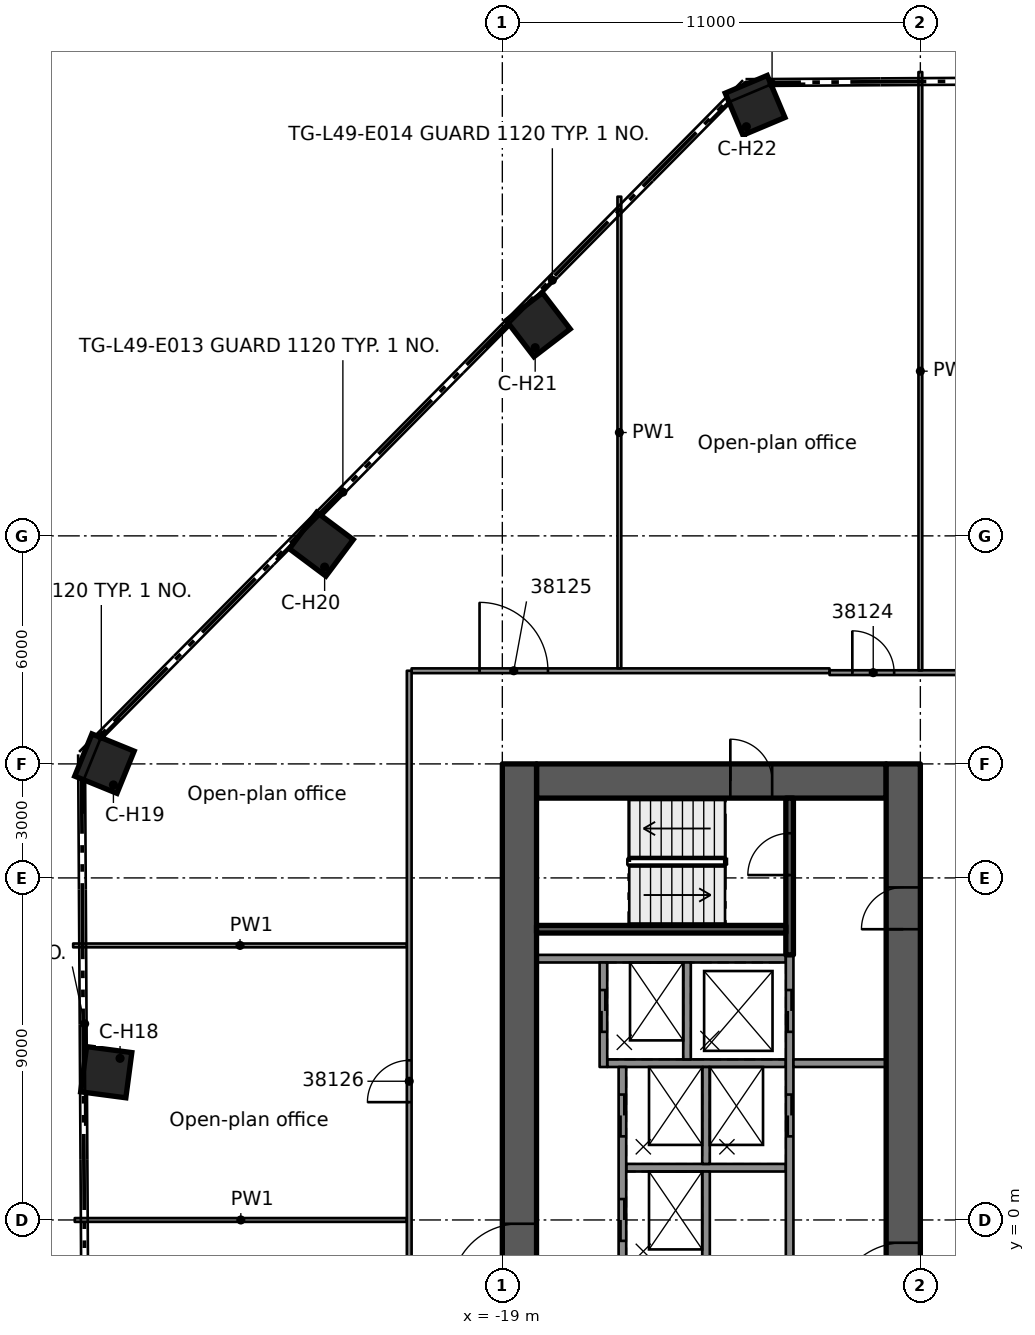
"""IFC4 building model, lengths in metres.
Left out: names, types, materials, properties, quantities, classifications, styles, units other than length and angle.
Written with IfcOpenShell. Run it as: python <this file> out.ifc"""

import sys

from ifc_helpers import new_model, si_unit, direction, frame, frame_2d, origin, origin_2d, place, context, subcontext, project, spatial, rectangle, extrude, element, fill, save


model = new_model("IFC4")
c1 = context("Model", 3, precision=1e-05, world=origin(), true_north=direction((0.0, 1.0)))
c2 = subcontext(c1, "Body", "Model", "MODEL_VIEW")
j1 = project(units=[si_unit("LENGTHUNIT", "METRE"), si_unit("PLANEANGLEUNIT", "RADIAN")], contexts=[c1])
p1 = place(None, origin())
s1 = spatial("IfcSite", under=j1, at=p1, CompositionType="ELEMENT")
p2 = place(p1, origin())
s2 = spatial("IfcBuilding", under=s1, at=p2, CompositionType="ELEMENT")
p3 = place(p2, frame((0.0, 0.0, 188.6)))
s3 = spatial("IfcBuildingStorey", under=s2, at=p3, CompositionType="ELEMENT", Elevation=188.6)
p4 = place(p3, frame((-18.1, 11.55, 0.0), z_axis=(0.0, 0.0, 1.0), x_axis=(1.0, 0.0, 0.0)))
e1 = element("IfcWall", 1, at=p4, inside=s3, PredefinedType="SHEAR", context=c2, shape_type="SweptSolid", body=[
    extrude(rectangle(XDim=9.2, YDim=0.9, at=frame_2d((4.6, 0.0))), origin(), (0.0, 0.0, 1.0), 3.5),
])
p5 = place(p4, frame((5.1, 0.0, 0.0)))
e2 = element("IfcOpeningElement", 2, at=p5, cuts=e1, PredefinedType="OPENING", context=c2, shape_type="SweptSolid", body=[
    extrude(rectangle(XDim=1.1, YDim=2.1, at=frame_2d((0.55, 1.05))), frame((0.0, 0.46, 0.0), z_axis=(0.0, -1.0, 0.0), x_axis=(1.0, 0.0, 0.0)), (0.0, 0.0, 1.0), 0.92),
])
p6 = place(p3, frame((-18.55, -12.0, 0.0), z_axis=(0.0, 0.0, 1.0), x_axis=(0.0, 1.0, 0.0)))
e3 = element("IfcWall", 3, at=p6, inside=s3, PredefinedType="SHEAR", context=c2, shape_type="SweptSolid", body=[
    extrude(rectangle(XDim=24.0, YDim=0.9, at=frame_2d((12.0, 0.0))), origin(), (0.0, 0.0, 1.0), 3.5),
])
p7 = place(p6, frame((10.1, 0.0, 0.0)))
e4 = element("IfcOpeningElement", 4, at=p7, cuts=e3, PredefinedType="OPENING", context=c2, shape_type="SweptSolid", body=[
    extrude(rectangle(XDim=1.8, YDim=2.1, at=frame_2d((0.9, 1.05))), frame((0.0, 0.46, 0.0), z_axis=(0.0, -1.0, 0.0), x_axis=(1.0, 0.0, 0.0)), (0.0, 0.0, 1.0), 0.92),
])
p8 = place(p3, frame((-8.45, -12.0, 0.0), z_axis=(0.0, 0.0, 1.0), x_axis=(0.0, 1.0, 0.0)))
e5 = element("IfcWall", 5, at=p8, inside=s3, PredefinedType="SHEAR", context=c2, shape_type="SweptSolid", body=[
    extrude(rectangle(XDim=24.0, YDim=0.9, at=frame_2d((12.0, 0.0))), origin(), (0.0, 0.0, 1.0), 3.5),
])
p9 = place(p8, frame((9.6, 0.0, 0.0)))
e6 = element("IfcOpeningElement", 6, at=p9, cuts=e5, PredefinedType="OPENING", context=c2, shape_type="SweptSolid", body=[
    extrude(rectangle(XDim=1.8, YDim=2.1, at=frame_2d((0.9, 1.05))), frame((0.0, 0.46, 0.0), z_axis=(0.0, -1.0, 0.0), x_axis=(1.0, 0.0, 0.0)), (0.0, 0.0, 1.0), 0.92),
])
p10 = place(p8, frame((19.65, 0.0, 0.0)))
e7 = element("IfcOpeningElement", 7, at=p10, cuts=e5, PredefinedType="OPENING", context=c2, shape_type="SweptSolid", body=[
    extrude(rectangle(XDim=1.1, YDim=2.1, at=frame_2d((0.55, 1.05))), frame((0.0, 0.46, 0.0), z_axis=(0.0, -1.0, 0.0), x_axis=(1.0, 0.0, 0.0)), (0.0, 0.0, 1.0), 0.92),
])
for number, where, z_axis, x_axis in (
    (8, (-29.423, 3.888, 0.0), (0.0, 0.0, 1.0), (-0.991, 0.131, 0.0)),
    (9, (-29.47, 12.007, 0.0), (0.0, 0.0, 1.0), (-0.926, 0.377, 0.0)),
    (10, (-23.763, 17.781, 0.0), (0.0, 0.0, 1.0), (-0.801, 0.599, 0.0)),
    (11, (-18.056, 23.555, 0.0), (0.0, 0.0, 1.0), (-0.608, 0.794, 0.0)),
    (12, (-12.349, 29.329, 0.0), (0.0, 0.0, 1.0), (-0.388, 0.922, 0.0)),
):
    element("IfcColumn", number, at=place(p3, frame(where, z_axis=z_axis, x_axis=x_axis)), inside=s3, PredefinedType="COLUMN", context=c2, shape_type="SweptSolid", body=[
        extrude(rectangle(XDim=1.2, YDim=1.2, at=origin_2d()), origin(), (0.0, 0.0, 1.0), 3.5),
    ])
p11 = place(p3, frame((-11.54, 6.875, 0.0), z_axis=(0.0, 0.0, 1.0), x_axis=(-1.0, 0.0, 0.0)))
e13 = element("IfcWall", 13, at=p11, inside=s3, PredefinedType="SOLIDWALL", context=c2, shape_type="SweptSolid", body=[
    extrude(rectangle(XDim=6.56, YDim=0.2, at=frame_2d((3.28, 0.0))), origin(), (0.0, 0.0, 1.0), 3.08),
])
p12 = place(p3, frame((-11.54, 1.375, 0.0), z_axis=(0.0, 0.0, 1.0), x_axis=(-1.0, 0.0, 0.0)))
e14 = element("IfcWall", 14, at=p12, inside=s3, PredefinedType="SOLIDWALL", context=c2, shape_type="SweptSolid", body=[
    extrude(rectangle(XDim=4.2, YDim=0.2, at=frame_2d((2.1, 0.0))), origin(), (0.0, 0.0, 1.0), 3.08),
])
p13 = place(p3, frame((-11.54, 4.125, 0.0), z_axis=(0.0, 0.0, 1.0), x_axis=(-1.0, 0.0, 0.0)))
e15 = element("IfcWall", 15, at=p13, inside=s3, PredefinedType="SOLIDWALL", context=c2, shape_type="SweptSolid", body=[
    extrude(rectangle(XDim=4.7, YDim=0.2, at=frame_2d((2.35, 0.0))), origin(), (0.0, 0.0, 1.0), 3.08),
])
p14 = place(p3, frame((-11.44, -6.975, 0.0), z_axis=(0.0, 0.0, 1.0), x_axis=(0.0, 1.0, 0.0)))
e16 = element("IfcWall", 16, at=p14, inside=s3, PredefinedType="SOLIDWALL", context=c2, shape_type="SweptSolid", body=[
    extrude(rectangle(XDim=13.95, YDim=0.2, at=frame_2d((6.975, 0.0))), origin(), (0.0, 0.0, 1.0), 3.08),
])
p15 = place(p14, frame((9.175, 0.0, 0.0)))
e17 = element("IfcOpeningElement", 17, at=p15, cuts=e16, PredefinedType="OPENING", context=c2, shape_type="SweptSolid", body=[
    extrude(rectangle(XDim=1.1, YDim=2.1, at=frame_2d((0.55, 1.05))), frame((0.0, 0.11, 0.0), z_axis=(0.0, -1.0, 0.0), x_axis=(1.0, 0.0, 0.0)), (0.0, 0.0, 1.0), 0.22),
])
p16 = place(p14, frame((11.925, 0.0, 0.0)))
e18 = element("IfcOpeningElement", 18, at=p16, cuts=e16, PredefinedType="OPENING", context=c2, shape_type="SweptSolid", body=[
    extrude(rectangle(XDim=1.1, YDim=2.1, at=frame_2d((0.55, 1.05))), frame((0.0, 0.11, 0.0), z_axis=(0.0, -1.0, 0.0), x_axis=(1.0, 0.0, 0.0)), (0.0, 0.0, 1.0), 0.22),
])
p17 = place(p14, frame((1.075, 0.0, 0.0)))
e19 = element("IfcOpeningElement", 19, at=p17, cuts=e16, PredefinedType="OPENING", context=c2, shape_type="SweptSolid", body=[
    extrude(rectangle(XDim=0.8, YDim=2.1, at=frame_2d((0.4, 1.05))), frame((0.0, 0.11, 0.0), z_axis=(0.0, -1.0, 0.0), x_axis=(1.0, 0.0, 0.0)), (0.0, 0.0, 1.0), 0.22),
])
p18 = place(p3, frame((-13.64, -6.775, 0.0), z_axis=(0.0, 0.0, 1.0), x_axis=(0.0, 1.0, 0.0)))
e20 = element("IfcWall", 20, at=p18, inside=s3, PredefinedType="SOLIDWALL", context=c2, shape_type="SweptSolid", body=[
    extrude(rectangle(XDim=8.05, YDim=0.2, at=frame_2d((4.025, 0.0))), origin(), (0.0, 0.0, 1.0), 3.08),
])
for number, where, z_axis, x_axis in (
    (21, (-13.64, 1.475, 0.0), (0.0, 0.0, 1.0), (0.0, 1.0, 0.0)),
    (22, (-14.14, 4.225, 0.0), (0.0, 0.0, 1.0), (0.0, 1.0, 0.0)),
):
    element("IfcWall", number, at=place(p3, frame(where, z_axis=z_axis, x_axis=x_axis)), inside=s3, PredefinedType="SOLIDWALL", context=c2, shape_type="SweptSolid", body=[
        extrude(rectangle(XDim=2.55, YDim=0.2, at=frame_2d((1.275, 0.0))), origin(), (0.0, 0.0, 1.0), 3.08),
    ])
p19 = place(p3, frame((-15.84, -4.025, 0.0), z_axis=(0.0, 0.0, 1.0), x_axis=(0.0, 1.0, 0.0)))
e23 = element("IfcWall", 23, at=p19, inside=s3, PredefinedType="SOLIDWALL", context=c2, shape_type="SweptSolid", body=[
    extrude(rectangle(XDim=8.05, YDim=0.2, at=frame_2d((4.025, 0.0))), origin(), (0.0, 0.0, 1.0), 3.08),
])
p20 = place(p19, frame((3.475, 0.0, 0.0)))
e24 = element("IfcOpeningElement", 24, at=p20, cuts=e23, PredefinedType="OPENING", context=c2, shape_type="SweptSolid", body=[
    extrude(rectangle(XDim=1.1, YDim=2.1, at=frame_2d((0.55, 1.05))), frame((0.0, 0.11, 0.0), z_axis=(0.0, -1.0, 0.0), x_axis=(1.0, 0.0, 0.0)), (0.0, 0.0, 1.0), 0.22),
])
p21 = place(p19, frame((6.225, 0.0, 0.0)))
e25 = element("IfcOpeningElement", 25, at=p21, cuts=e23, PredefinedType="OPENING", context=c2, shape_type="SweptSolid", body=[
    extrude(rectangle(XDim=1.1, YDim=2.1, at=frame_2d((0.55, 1.05))), frame((0.0, 0.11, 0.0), z_axis=(0.0, -1.0, 0.0), x_axis=(1.0, 0.0, 0.0)), (0.0, 0.0, 1.0), 0.22),
])
p22 = place(p3, frame((-16.34, 4.025, 0.0), z_axis=(0.0, 0.0, 1.0), x_axis=(0.0, 1.0, 0.0)))
e26 = element("IfcWall", 26, at=p22, inside=s3, PredefinedType="SOLIDWALL", context=c2, shape_type="SweptSolid", body=[
    extrude(rectangle(XDim=2.75, YDim=0.2, at=frame_2d((1.375, 0.0))), origin(), (0.0, 0.0, 1.0), 3.08),
])
p23 = place(p22, frame((0.925, 0.0, 0.0)))
e27 = element("IfcOpeningElement", 27, at=p23, cuts=e26, PredefinedType="OPENING", context=c2, shape_type="SweptSolid", body=[
    extrude(rectangle(XDim=1.1, YDim=2.1, at=frame_2d((0.55, 1.05))), frame((0.0, 0.11, 0.0), z_axis=(0.0, -1.0, 0.0), x_axis=(1.0, 0.0, 0.0)), (0.0, 0.0, 1.0), 0.22),
])
p24 = place(p3, frame((-11.44, 6.975, 0.0), z_axis=(0.0, 0.0, 1.0), x_axis=(0.0, 1.0, 0.0)))
e28 = element("IfcWall", 28, at=p24, inside=s3, PredefinedType="SOLIDWALL", context=c2, shape_type="SweptSolid", body=[
    extrude(rectangle(XDim=4.125, YDim=0.2, at=frame_2d((2.062, 0.0))), origin(), (0.0, 0.0, 1.0), 3.08),
])
p25 = place(p24, frame((2.1, 0.0, 0.0)))
e29 = element("IfcOpeningElement", 29, at=p25, cuts=e28, PredefinedType="OPENING", context=c2, shape_type="SweptSolid", body=[
    extrude(rectangle(XDim=1.1, YDim=2.1, at=frame_2d((0.55, 1.05))), frame((0.0, 0.11, 0.0), z_axis=(0.0, -1.0, 0.0), x_axis=(1.0, 0.0, 0.0)), (0.0, 0.0, 1.0), 0.22),
])
p26 = place(p3, frame((-11.54, 7.65, 0.0), z_axis=(0.0, 0.0, 1.0), x_axis=(-1.0, 0.0, 0.0)))
e30 = element("IfcWall", 30, at=p26, inside=s3, PredefinedType="SOLIDWALL", context=c2, shape_type="SweptSolid", body=[
    extrude(rectangle(XDim=6.56, YDim=0.2, at=frame_2d((3.28, 0.0))), origin(), (0.0, 0.0, 1.0), 3.08),
])
p27 = place(p3, frame((-8.9, 4.125, 0.0), z_axis=(0.0, 0.0, 1.0), x_axis=(-1.0, 0.0, 0.0)))
e31 = element("IfcWall", 31, at=p27, inside=s3, PredefinedType="PARTITIONING", context=c2, shape_type="SweptSolid", body=[
    extrude(rectangle(XDim=2.44, YDim=0.2, at=frame_2d((1.22, 0.0))), origin(), (0.0, 0.0, 1.0), 3.08),
])
p28 = place(p3, frame((-30.251, 0.0, 0.0), z_axis=(0.0, 0.0, 1.0), x_axis=(1.0, 0.0, 0.0)))
e32 = element("IfcWall", 32, at=p28, inside=s3, PredefinedType="PARTITIONING", context=c2, shape_type="SweptSolid", body=[
    extrude(rectangle(XDim=8.739, YDim=0.1, at=frame_2d((4.37, 0.0))), origin(), (0.0, 0.0, 1.0), 3.06),
])
p29 = place(p3, frame((-30.293, 7.224, 0.0), z_axis=(0.0, 0.0, 1.0), x_axis=(1.0, 0.0, 0.0)))
e33 = element("IfcWall", 33, at=p29, inside=s3, PredefinedType="PARTITIONING", context=c2, shape_type="SweptSolid", body=[
    extrude(rectangle(XDim=8.781, YDim=0.1, at=frame_2d((4.391, 0.0))), origin(), (0.0, 0.0, 1.0), 3.06),
])
p30 = place(p3, frame((-10.39, 14.401, 0.0), z_axis=(0.0, 0.0, 1.0), x_axis=(1.0, 0.0, 0.0)))
e34 = element("IfcWall", 34, at=p30, inside=s3, PredefinedType="PARTITIONING", context=c2, shape_type="SweptSolid", body=[
    extrude(rectangle(XDim=20.781, YDim=0.125, at=frame_2d((10.391, 0.0))), origin(), (0.0, 0.0, 1.0), 3.06),
])
p31 = place(p30, frame((18.99, 0.0, 0.0)))
e35 = element("IfcOpeningElement", 35, at=p31, cuts=e34, PredefinedType="OPENING", context=c2, shape_type="SweptSolid", body=[
    extrude(rectangle(XDim=1.1, YDim=2.1, at=frame_2d((0.55, 1.05))), frame((0.0, 0.073, 0.0), z_axis=(0.0, -1.0, 0.0), x_axis=(1.0, 0.0, 0.0)), (0.0, 0.0, 1.0), 0.145),
])
p32 = place(p30, frame((13.49, 0.0, 0.0)))
e36 = element("IfcOpeningElement", 36, at=p32, cuts=e34, PredefinedType="OPENING", context=c2, shape_type="SweptSolid", body=[
    extrude(rectangle(XDim=1.8, YDim=2.1, at=frame_2d((0.9, 1.05))), frame((0.0, 0.073, 0.0), z_axis=(0.0, -1.0, 0.0), x_axis=(1.0, 0.0, 0.0)), (0.0, 0.0, 1.0), 0.145),
])
p33 = place(p30, frame((5.49, 0.0, 0.0)))
e37 = element("IfcOpeningElement", 37, at=p33, cuts=e34, PredefinedType="OPENING", context=c2, shape_type="SweptSolid", body=[
    extrude(rectangle(XDim=1.8, YDim=2.1, at=frame_2d((0.9, 1.05))), frame((0.0, 0.073, 0.0), z_axis=(0.0, -1.0, 0.0), x_axis=(1.0, 0.0, 0.0)), (0.0, 0.0, 1.0), 0.145),
])
p34 = place(p30, frame((0.6, 0.0, 0.0)))
e38 = element("IfcOpeningElement", 38, at=p34, cuts=e34, PredefinedType="OPENING", context=c2, shape_type="SweptSolid", body=[
    extrude(rectangle(XDim=1.1, YDim=2.1, at=frame_2d((0.55, 1.05))), frame((0.0, 0.073, 0.0), z_axis=(0.0, -1.0, 0.0), x_axis=(1.0, 0.0, 0.0)), (0.0, 0.0, 1.0), 0.145),
])
p35 = place(p3, frame((-21.387, 14.451, 0.0), z_axis=(0.0, 0.0, 1.0), x_axis=(1.0, 0.0, 0.0)))
e39 = element("IfcWall", 39, at=p35, inside=s3, PredefinedType="PARTITIONING", context=c2, shape_type="SweptSolid", body=[
    extrude(rectangle(XDim=10.996, YDim=0.125, at=frame_2d((5.498, 0.0))), origin(), (0.0, 0.0, 1.0), 3.06),
])
p36 = place(p35, frame((1.788, 0.0, 0.0)))
e40 = element("IfcOpeningElement", 40, at=p36, cuts=e39, PredefinedType="OPENING", context=c2, shape_type="SweptSolid", body=[
    extrude(rectangle(XDim=1.8, YDim=2.1, at=frame_2d((0.9, 1.05))), frame((0.0, 0.073, 0.0), z_axis=(0.0, -1.0, 0.0), x_axis=(1.0, 0.0, 0.0)), (0.0, 0.0, 1.0), 0.145),
])
p37 = place(p3, frame((-8.0, 14.463, 0.0), z_axis=(0.0, 0.0, 1.0), x_axis=(0.0, 1.0, 0.0)))
e41 = element("IfcWall", 41, at=p37, inside=s3, PredefinedType="PARTITIONING", context=c2, shape_type="SweptSolid", body=[
    extrude(rectangle(XDim=15.741, YDim=0.1, at=frame_2d((7.871, 0.0))), origin(), (0.0, 0.0, 1.0), 3.06),
])
p38 = place(p3, frame((-15.92, 14.514, 0.0), z_axis=(0.0, 0.0, 1.0), x_axis=(0.0, 1.0, 0.0)))
e42 = element("IfcWall", 42, at=p38, inside=s3, PredefinedType="PARTITIONING", context=c2, shape_type="SweptSolid", body=[
    extrude(rectangle(XDim=12.411, YDim=0.1, at=frame_2d((6.206, 0.0))), origin(), (0.0, 0.0, 1.0), 3.06),
])
p39 = place(p3, frame((-21.45, -14.451, 0.0), z_axis=(0.0, 0.0, 1.0), x_axis=(0.0, 1.0, 0.0)))
e43 = element("IfcWall", 43, at=p39, inside=s3, PredefinedType="PARTITIONING", context=c2, shape_type="SweptSolid", body=[
    extrude(rectangle(XDim=28.902, YDim=0.125, at=frame_2d((14.451, 0.0))), origin(), (0.0, 0.0, 1.0), 3.06),
])
p40 = place(p39, frame((6.35, 0.0, 0.0)))
e44 = element("IfcOpeningElement", 44, at=p40, cuts=e43, PredefinedType="OPENING", context=c2, shape_type="SweptSolid", body=[
    extrude(rectangle(XDim=1.8, YDim=2.1, at=frame_2d((0.9, 1.05))), frame((0.0, 0.073, 0.0), z_axis=(0.0, -1.0, 0.0), x_axis=(1.0, 0.0, 0.0)), (0.0, 0.0, 1.0), 0.145),
])
p41 = place(p39, frame((17.551, 0.0, 0.0)))
e45 = element("IfcOpeningElement", 45, at=p41, cuts=e43, PredefinedType="OPENING", context=c2, shape_type="SweptSolid", body=[
    extrude(rectangle(XDim=1.1, YDim=2.1, at=frame_2d((0.55, 1.05))), frame((0.0, 0.073, 0.0), z_axis=(0.0, -1.0, 0.0), x_axis=(1.0, 0.0, 0.0)), (0.0, 0.0, 1.0), 0.145),
])
p42 = place(p20, origin())
e46 = element("IfcDoor", 46, at=p42, inside=s3, OperationType="DOUBLE_DOOR_SLIDING", PredefinedType="DOOR", context=c2, shape_type="SweptSolid", body=[
    extrude(rectangle(XDim=1.1, YDim=2.1, at=frame_2d((0.55, 1.05))), frame((0.0, 0.025, 0.0), z_axis=(0.0, -1.0, 0.0), x_axis=(1.0, 0.0, 0.0)), (0.0, 0.0, 1.0), 0.05),
])
fill(e24, e46)
p43 = place(p15, origin())
e47 = element("IfcDoor", 47, at=p43, inside=s3, OperationType="DOUBLE_DOOR_SLIDING", PredefinedType="DOOR", context=c2, shape_type="SweptSolid", body=[
    extrude(rectangle(XDim=1.1, YDim=2.1, at=frame_2d((0.55, 1.05))), frame((0.0, 0.025, 0.0), z_axis=(0.0, -1.0, 0.0), x_axis=(1.0, 0.0, 0.0)), (0.0, 0.0, 1.0), 0.05),
])
fill(e17, e47)
p44 = place(p21, origin())
e48 = element("IfcDoor", 48, at=p44, inside=s3, OperationType="DOUBLE_DOOR_SLIDING", PredefinedType="DOOR", context=c2, shape_type="SweptSolid", body=[
    extrude(rectangle(XDim=1.1, YDim=2.1, at=frame_2d((0.55, 1.05))), frame((0.0, 0.025, 0.0), z_axis=(0.0, -1.0, 0.0), x_axis=(1.0, 0.0, 0.0)), (0.0, 0.0, 1.0), 0.05),
])
fill(e25, e48)
p45 = place(p16, origin())
e49 = element("IfcDoor", 49, at=p45, inside=s3, OperationType="DOUBLE_DOOR_SLIDING", PredefinedType="DOOR", context=c2, shape_type="SweptSolid", body=[
    extrude(rectangle(XDim=1.1, YDim=2.1, at=frame_2d((0.55, 1.05))), frame((0.0, 0.025, 0.0), z_axis=(0.0, -1.0, 0.0), x_axis=(1.0, 0.0, 0.0)), (0.0, 0.0, 1.0), 0.05),
])
fill(e18, e49)
p46 = place(p23, origin())
e50 = element("IfcDoor", 50, at=p46, inside=s3, OperationType="DOUBLE_DOOR_SLIDING", PredefinedType="DOOR", context=c2, shape_type="SweptSolid", body=[
    extrude(rectangle(XDim=1.1, YDim=2.1, at=frame_2d((0.55, 1.05))), frame((0.0, 0.025, 0.0), z_axis=(0.0, -1.0, 0.0), x_axis=(1.0, 0.0, 0.0)), (0.0, 0.0, 1.0), 0.05),
])
fill(e27, e50)
p47 = place(p9, origin())
e51 = element("IfcDoor", 51, at=p47, inside=s3, OperationType="SINGLE_SWING_LEFT", PredefinedType="DOOR", context=c2, shape_type="SweptSolid", body=[
    extrude(rectangle(XDim=1.8, YDim=2.1, at=frame_2d((0.9, 1.05))), frame((0.0, 0.025, 0.0), z_axis=(0.0, -1.0, 0.0), x_axis=(1.0, 0.0, 0.0)), (0.0, 0.0, 1.0), 0.05),
])
fill(e6, e51)
p48 = place(p7, origin())
e52 = element("IfcDoor", 52, at=p48, inside=s3, OperationType="SINGLE_SWING_LEFT", PredefinedType="DOOR", context=c2, shape_type="SweptSolid", body=[
    extrude(rectangle(XDim=1.8, YDim=2.1, at=frame_2d((0.9, 1.05))), frame((0.0, 0.025, 0.0), z_axis=(0.0, -1.0, 0.0), x_axis=(1.0, 0.0, 0.0)), (0.0, 0.0, 1.0), 0.05),
])
fill(e4, e52)
p49 = place(p10, origin())
e53 = element("IfcDoor", 53, at=p49, inside=s3, OperationType="SINGLE_SWING_RIGHT", PredefinedType="DOOR", context=c2, shape_type="SweptSolid", body=[
    extrude(rectangle(XDim=1.1, YDim=2.1, at=frame_2d((0.55, 1.05))), frame((0.0, 0.025, 0.0), z_axis=(0.0, -1.0, 0.0), x_axis=(1.0, 0.0, 0.0)), (0.0, 0.0, 1.0), 0.05),
])
fill(e7, e53)
p50 = place(p5, origin())
e54 = element("IfcDoor", 54, at=p50, inside=s3, OperationType="SINGLE_SWING_RIGHT", PredefinedType="DOOR", context=c2, shape_type="SweptSolid", body=[
    extrude(rectangle(XDim=1.1, YDim=2.1, at=frame_2d((0.55, 1.05))), frame((0.0, 0.025, 0.0), z_axis=(0.0, -1.0, 0.0), x_axis=(1.0, 0.0, 0.0)), (0.0, 0.0, 1.0), 0.05),
])
fill(e2, e54)
p51 = place(p25, origin())
e55 = element("IfcDoor", 55, at=p51, inside=s3, OperationType="SINGLE_SWING_RIGHT", PredefinedType="DOOR", context=c2, shape_type="SweptSolid", body=[
    extrude(rectangle(XDim=1.1, YDim=2.1, at=frame_2d((0.55, 1.05))), frame((0.0, 0.025, 0.0), z_axis=(0.0, -1.0, 0.0), x_axis=(1.0, 0.0, 0.0)), (0.0, 0.0, 1.0), 0.05),
])
fill(e29, e55)
p52 = place(p34, origin())
e56 = element("IfcDoor", 56, at=p52, inside=s3, OperationType="SINGLE_SWING_LEFT", PredefinedType="DOOR", context=c2, shape_type="SweptSolid", body=[
    extrude(rectangle(XDim=1.1, YDim=2.1, at=frame_2d((0.55, 1.05))), frame((0.0, 0.025, 0.0), z_axis=(0.0, -1.0, 0.0), x_axis=(1.0, 0.0, 0.0)), (0.0, 0.0, 1.0), 0.05),
])
fill(e38, e56)
p53 = place(p36, origin())
e57 = element("IfcDoor", 57, at=p53, inside=s3, OperationType="DOUBLE_DOOR_SINGLE_SWING", PredefinedType="DOOR", context=c2, shape_type="SweptSolid", body=[
    extrude(rectangle(XDim=1.8, YDim=2.1, at=frame_2d((0.9, 1.05))), frame((0.0, 0.025, 0.0), z_axis=(0.0, -1.0, 0.0), x_axis=(1.0, 0.0, 0.0)), (0.0, 0.0, 1.0), 0.05),
])
fill(e40, e57)
p54 = place(p41, origin())
e58 = element("IfcDoor", 58, at=p54, inside=s3, OperationType="SINGLE_SWING_RIGHT", PredefinedType="DOOR", context=c2, shape_type="SweptSolid", body=[
    extrude(rectangle(XDim=1.1, YDim=2.1, at=frame_2d((0.55, 1.05))), frame((0.0, 0.025, 0.0), z_axis=(0.0, -1.0, 0.0), x_axis=(1.0, 0.0, 0.0)), (0.0, 0.0, 1.0), 0.05),
])
fill(e45, e58)
save(model, sys.argv[1])
